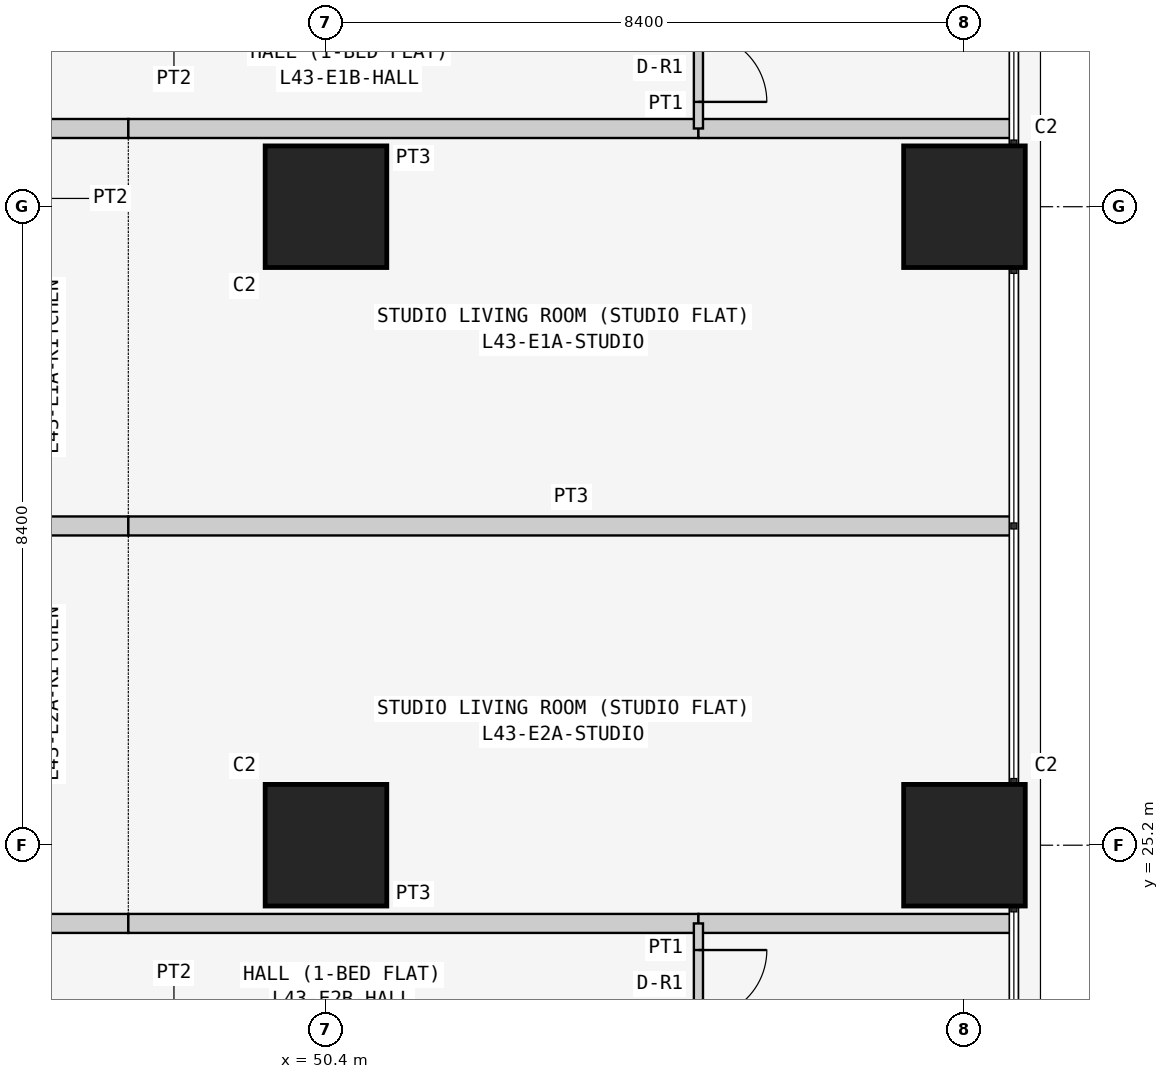
"""IFC4 building model, lengths in metres.
Left out: names, types, materials, properties, quantities, classifications, styles, units other than length and angle.
Written with IfcOpenShell. Run it as: python <this file> out.ifc"""

import sys

from ifc_helpers import new_model, si_unit, direction, frame, frame_2d, origin, origin_2d, place, context, subcontext, project, spatial, rectangle, extrude, element, fill, save


model = new_model("IFC4")
c1 = context("Model", 3, precision=1e-05, world=origin(), true_north=direction((0.0, 1.0)))
c2 = subcontext(c1, "Body", "Model", "MODEL_VIEW")
j1 = project(units=[si_unit("LENGTHUNIT", "METRE"), si_unit("PLANEANGLEUNIT", "RADIAN")], contexts=[c1])
p1 = place(None, origin())
s1 = spatial("IfcSite", under=j1, at=p1, CompositionType="ELEMENT")
p2 = place(p1, origin())
s2 = spatial("IfcBuilding", under=s1, at=p2, CompositionType="ELEMENT")
p3 = place(p2, frame((0.0, 0.0, 166.5)))
s3 = spatial("IfcBuildingStorey", under=s2, at=p3, CompositionType="ELEMENT", Elevation=166.5)
for number, where, z_axis, x_axis in (
    (1, (50.4, 25.2, 0.0), (0.0, 0.0, 1.0), (1.0, 0.0, 0.0)),
    (2, (50.4, 33.6, 0.0), (0.0, 0.0, 1.0), (1.0, 0.0, 0.0)),
    (3, (58.8, 25.2, 0.0), (0.0, 0.0, 1.0), (1.0, 0.0, 0.0)),
    (4, (58.8, 33.6, 0.0), (0.0, 0.0, 1.0), (1.0, 0.0, 0.0)),
):
    element("IfcColumn", number, at=place(p3, frame(where, z_axis=z_axis, x_axis=x_axis)), inside=s3, PredefinedType="COLUMN", context=c2, shape_type="SweptSolid", body=[
        extrude(rectangle(XDim=1.6, YDim=1.6, at=origin_2d()), origin(), (0.0, 0.0, 1.0), 3.6),
    ])
for number, where, z_axis, x_axis in (
    (5, (47.8, 34.629, 0.0), (0.0, 0.0, 1.0), (-1.0, 0.0, 0.0)),
    (6, (45.4, 29.4, 0.0), (0.0, 0.0, 1.0), (1.0, 0.0, 0.0)),
):
    element("IfcWall", number, at=place(p3, frame(where, z_axis=z_axis, x_axis=x_axis)), inside=s3, PredefinedType="PARTITIONING", context=c2, shape_type="SweptSolid", body=[
        extrude(rectangle(XDim=2.4, YDim=0.25, at=frame_2d((1.2, 0.0))), origin(), (0.0, 0.0, 1.0), 3.45),
    ])
p4 = place(p3, frame((55.3, 34.629, 0.0), z_axis=(0.0, 0.0, 1.0), x_axis=(-1.0, 0.0, 0.0)))
e7 = element("IfcWall", 7, at=p4, inside=s3, PredefinedType="PARTITIONING", context=c2, shape_type="SweptSolid", body=[
    extrude(rectangle(XDim=7.5, YDim=0.25, at=frame_2d((3.75, 0.0))), origin(), (0.0, 0.0, 1.0), 3.45),
])
p5 = place(p3, frame((59.45, 34.629, 0.0), z_axis=(0.0, 0.0, 1.0), x_axis=(-1.0, 0.0, 0.0)))
e8 = element("IfcWall", 8, at=p5, inside=s3, PredefinedType="PARTITIONING", context=c2, shape_type="SweptSolid", body=[
    extrude(rectangle(XDim=4.15, YDim=0.25, at=frame_2d((2.075, 0.0))), origin(), (0.0, 0.0, 1.0), 3.45),
])
p6 = place(p3, frame((47.8, 29.4, 0.0), z_axis=(0.0, 0.0, 1.0), x_axis=(1.0, 0.0, 0.0)))
e9 = element("IfcWall", 9, at=p6, inside=s3, PredefinedType="PARTITIONING", context=c2, shape_type="SweptSolid", body=[
    extrude(rectangle(XDim=11.65, YDim=0.25, at=frame_2d((5.825, 0.0))), origin(), (0.0, 0.0, 1.0), 3.45),
])
p7 = place(p3, frame((55.3, 34.629, 0.0), z_axis=(0.0, 0.0, 1.0), x_axis=(0.0, 1.0, 0.0)))
e10 = element("IfcWall", 10, at=p7, inside=s3, PredefinedType="PARTITIONING", context=c2, shape_type="SweptSolid", body=[
    extrude(rectangle(XDim=1.6, YDim=0.12, at=frame_2d((0.8, 0.0))), origin(), (0.0, 0.0, 1.0), 3.45),
])
p8 = place(p7, frame((0.35, 0.0, 0.0)))
e11 = element("IfcOpeningElement", 11, at=p8, cuts=e10, PredefinedType="OPENING", context=c2, shape_type="SweptSolid", body=[
    extrude(rectangle(XDim=0.9, YDim=2.1, at=frame_2d((0.45, 1.05))), frame((0.0, 0.07, 0.0), z_axis=(0.0, -1.0, 0.0), x_axis=(1.0, 0.0, 0.0)), (0.0, 0.0, 1.0), 0.14),
])
p9 = place(p3, frame((47.8, 24.171, 0.0), z_axis=(0.0, 0.0, 1.0), x_axis=(-1.0, 0.0, 0.0)))
e12 = element("IfcWall", 12, at=p9, inside=s3, PredefinedType="PARTITIONING", context=c2, shape_type="SweptSolid", body=[
    extrude(rectangle(XDim=2.4, YDim=0.25, at=frame_2d((1.2, 0.0))), origin(), (0.0, 0.0, 1.0), 3.45),
])
p10 = place(p3, frame((55.3, 24.171, 0.0), z_axis=(0.0, 0.0, 1.0), x_axis=(-1.0, 0.0, 0.0)))
e13 = element("IfcWall", 13, at=p10, inside=s3, PredefinedType="PARTITIONING", context=c2, shape_type="SweptSolid", body=[
    extrude(rectangle(XDim=7.5, YDim=0.25, at=frame_2d((3.75, 0.0))), origin(), (0.0, 0.0, 1.0), 3.45),
])
p11 = place(p3, frame((59.45, 24.171, 0.0), z_axis=(0.0, 0.0, 1.0), x_axis=(-1.0, 0.0, 0.0)))
e14 = element("IfcWall", 14, at=p11, inside=s3, PredefinedType="PARTITIONING", context=c2, shape_type="SweptSolid", body=[
    extrude(rectangle(XDim=4.15, YDim=0.25, at=frame_2d((2.075, 0.0))), origin(), (0.0, 0.0, 1.0), 3.45),
])
p12 = place(p3, frame((55.3, 24.171, 0.0), z_axis=(0.0, 0.0, 1.0), x_axis=(0.0, -1.0, 0.0)))
e15 = element("IfcWall", 15, at=p12, inside=s3, PredefinedType="PARTITIONING", context=c2, shape_type="SweptSolid", body=[
    extrude(rectangle(XDim=1.6, YDim=0.12, at=frame_2d((0.8, 0.0))), origin(), (0.0, 0.0, 1.0), 3.45),
])
p13 = place(p12, frame((0.35, 0.0, 0.0)))
e16 = element("IfcOpeningElement", 16, at=p13, cuts=e15, PredefinedType="OPENING", context=c2, shape_type="SweptSolid", body=[
    extrude(rectangle(XDim=0.9, YDim=2.1, at=frame_2d((0.45, 1.05))), frame((0.0, 0.07, 0.0), z_axis=(0.0, -1.0, 0.0), x_axis=(1.0, 0.0, 0.0)), (0.0, 0.0, 1.0), 0.14),
])
p14 = place(p8, frame((0.9, 0.0, 0.0), z_axis=(0.0, 0.0, 1.0), x_axis=(-1.0, 0.0, 0.0)))
e17 = element("IfcDoor", 17, at=p14, inside=s3, OperationType="SINGLE_SWING_RIGHT", PredefinedType="DOOR", context=c2, shape_type="SweptSolid", body=[
    extrude(rectangle(XDim=0.9, YDim=2.1, at=frame_2d((0.45, 1.05))), frame((0.0, 0.025, 0.0), z_axis=(0.0, -1.0, 0.0), x_axis=(1.0, 0.0, 0.0)), (0.0, 0.0, 1.0), 0.05),
])
fill(e11, e17)
p15 = place(p13, origin())
e18 = element("IfcDoor", 18, at=p15, inside=s3, OperationType="SINGLE_SWING_LEFT", PredefinedType="DOOR", context=c2, shape_type="SweptSolid", body=[
    extrude(rectangle(XDim=0.9, YDim=2.1, at=frame_2d((0.45, 1.05))), frame((0.0, 0.025, 0.0), z_axis=(0.0, -1.0, 0.0), x_axis=(1.0, 0.0, 0.0)), (0.0, 0.0, 1.0), 0.05),
])
fill(e16, e18)
save(model, sys.argv[1])
